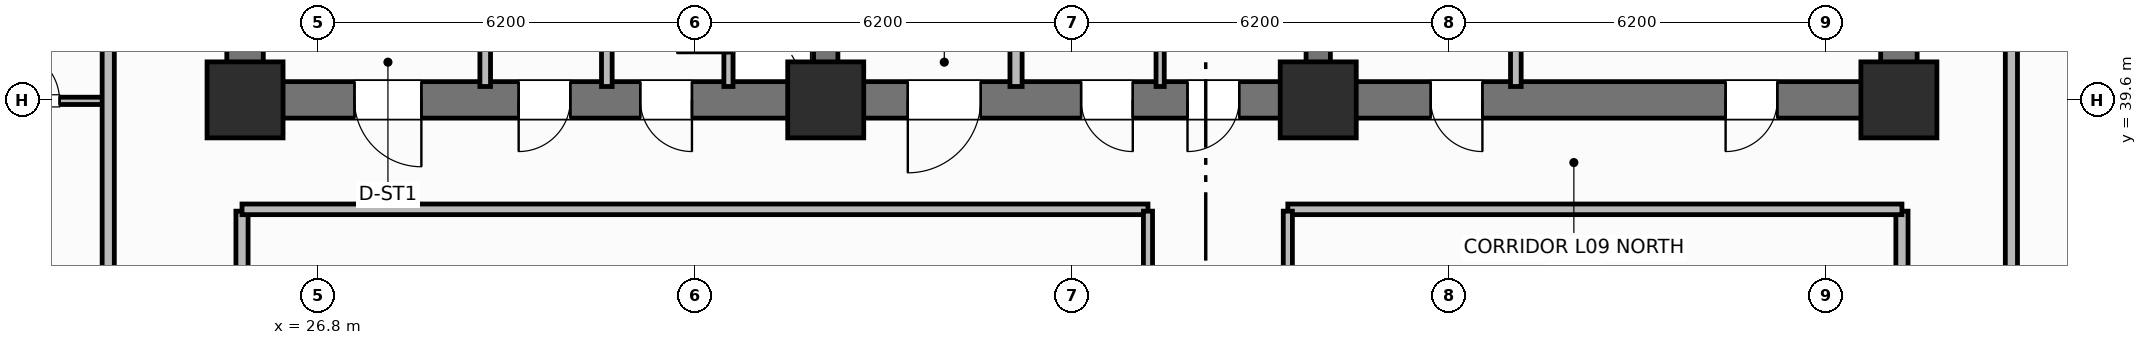
"""IFC4 building model, lengths in metres.
Left out: names, types, materials, properties, quantities, classifications, styles, units other than length and angle.
Written with IfcOpenShell. Run it as: python <this file> out.ifc"""

import sys

from ifc_helpers import new_model, si_unit, direction, frame, frame_2d, origin, origin_2d, place, context, subcontext, project, spatial, rectangle, extrude, element, fill, save


model = new_model("IFC4")
c1 = context("Model", 3, precision=1e-05, world=origin(), true_north=direction((0.0, 1.0)))
c2 = subcontext(c1, "Body", "Model", "MODEL_VIEW")
j1 = project(units=[si_unit("LENGTHUNIT", "METRE"), si_unit("PLANEANGLEUNIT", "RADIAN")], contexts=[c1])
p1 = place(None, origin())
s1 = spatial("IfcSite", under=j1, at=p1, CompositionType="ELEMENT")
p2 = place(p1, origin())
s2 = spatial("IfcBuilding", under=s1, at=p2, CompositionType="ELEMENT")
p3 = place(p2, frame((0.0, 0.0, 39.9)))
s3 = spatial("IfcBuildingStorey", under=s2, at=p3, CompositionType="ELEMENT", Elevation=39.9)
for number, where, z_axis, x_axis in (
    (1, (25.6, 39.9, 0.0), (0.0, 0.0, 1.0), (0.0, 1.0, 0.0)),
    (2, (52.8, 39.9, 0.0), (0.0, 0.0, 1.0), (0.0, 1.0, 0.0)),
):
    element("IfcWall", number, at=place(p3, frame(where, z_axis=z_axis, x_axis=x_axis)), inside=s3, PredefinedType="SHEAR", context=c2, shape_type="SweptSolid", body=[
        extrude(rectangle(XDim=5.6, YDim=0.6, at=frame_2d((2.8, 0.0))), origin(), (0.0, 0.0, 1.0), 3.7),
    ])
p4 = place(p3, frame((52.8, 39.6, 0.0), z_axis=(0.0, 0.0, 1.0), x_axis=(-1.0, 0.0, 0.0)))
e3 = element("IfcWall", 3, at=p4, inside=s3, PredefinedType="SHEAR", context=c2, shape_type="SweptSolid", body=[
    extrude(rectangle(XDim=27.2, YDim=0.6, at=frame_2d((13.6, 0.0))), origin(), (0.0, 0.0, 1.0), 3.7),
])
p5 = place(p4, frame((24.3, 0.0, 0.0)))
e4 = element("IfcOpeningElement", 4, at=p5, cuts=e3, PredefinedType="OPENING", context=c2, shape_type="SweptSolid", body=[
    extrude(rectangle(XDim=1.1, YDim=2.15, at=frame_2d((0.55, 1.075))), frame((0.0, 0.31, 0.0), z_axis=(0.0, -1.0, 0.0), x_axis=(1.0, 0.0, 0.0)), (0.0, 0.0, 1.0), 0.62),
])
p6 = place(p4, frame((21.85, 0.0, 0.0)))
e5 = element("IfcOpeningElement", 5, at=p6, cuts=e3, PredefinedType="OPENING", context=c2, shape_type="SweptSolid", body=[
    extrude(rectangle(XDim=0.85, YDim=2.1, at=frame_2d((0.425, 1.05))), frame((0.0, 0.31, 0.0), z_axis=(0.0, -1.0, 0.0), x_axis=(1.0, 0.0, 0.0)), (0.0, 0.0, 1.0), 0.62),
])
p7 = place(p4, frame((19.85, 0.0, 0.0)))
e6 = element("IfcOpeningElement", 6, at=p7, cuts=e3, PredefinedType="OPENING", context=c2, shape_type="SweptSolid", body=[
    extrude(rectangle(XDim=0.85, YDim=2.1, at=frame_2d((0.425, 1.05))), frame((0.0, 0.31, 0.0), z_axis=(0.0, -1.0, 0.0), x_axis=(1.0, 0.0, 0.0)), (0.0, 0.0, 1.0), 0.62),
])
p8 = place(p4, frame((15.1, 0.0, 0.0)))
e7 = element("IfcOpeningElement", 7, at=p8, cuts=e3, PredefinedType="OPENING", context=c2, shape_type="SweptSolid", body=[
    extrude(rectangle(XDim=1.2, YDim=2.15, at=frame_2d((0.6, 1.075))), frame((0.0, 0.31, 0.0), z_axis=(0.0, -1.0, 0.0), x_axis=(1.0, 0.0, 0.0)), (0.0, 0.0, 1.0), 0.62),
])
p9 = place(p4, frame((12.6, 0.0, 0.0)))
e8 = element("IfcOpeningElement", 8, at=p9, cuts=e3, PredefinedType="OPENING", context=c2, shape_type="SweptSolid", body=[
    extrude(rectangle(XDim=0.85, YDim=2.1, at=frame_2d((0.425, 1.05))), frame((0.0, 0.31, 0.0), z_axis=(0.0, -1.0, 0.0), x_axis=(1.0, 0.0, 0.0)), (0.0, 0.0, 1.0), 0.62),
])
p10 = place(p4, frame((10.85, 0.0, 0.0)))
e9 = element("IfcOpeningElement", 9, at=p10, cuts=e3, PredefinedType="OPENING", context=c2, shape_type="SweptSolid", body=[
    extrude(rectangle(XDim=0.85, YDim=2.1, at=frame_2d((0.425, 1.05))), frame((0.0, 0.31, 0.0), z_axis=(0.0, -1.0, 0.0), x_axis=(1.0, 0.0, 0.0)), (0.0, 0.0, 1.0), 0.62),
])
p11 = place(p4, frame((6.85, 0.0, 0.0)))
e10 = element("IfcOpeningElement", 10, at=p11, cuts=e3, PredefinedType="OPENING", context=c2, shape_type="SweptSolid", body=[
    extrude(rectangle(XDim=0.85, YDim=2.1, at=frame_2d((0.425, 1.05))), frame((0.0, 0.31, 0.0), z_axis=(0.0, -1.0, 0.0), x_axis=(1.0, 0.0, 0.0)), (0.0, 0.0, 1.0), 0.62),
])
p12 = place(p4, frame((2.0, 0.0, 0.0)))
e11 = element("IfcOpeningElement", 11, at=p12, cuts=e3, PredefinedType="OPENING", context=c2, shape_type="SweptSolid", body=[
    extrude(rectangle(XDim=0.85, YDim=2.1, at=frame_2d((0.425, 1.05))), frame((0.0, 0.31, 0.0), z_axis=(0.0, -1.0, 0.0), x_axis=(1.0, 0.0, 0.0)), (0.0, 0.0, 1.0), 0.62),
])
for number, where, z_axis, x_axis in (
    (12, (35.15, 39.9, 0.0), (0.0, 0.0, 1.0), (0.0, 1.0, 0.0)),
    (13, (43.25, 39.9, 0.0), (0.0, 0.0, 1.0), (0.0, 1.0, 0.0)),
):
    element("IfcWall", number, at=place(p3, frame(where, z_axis=z_axis, x_axis=x_axis)), inside=s3, PredefinedType="SHEAR", context=c2, shape_type="SweptSolid", body=[
        extrude(rectangle(XDim=5.6, YDim=0.4, at=frame_2d((2.8, 0.0))), origin(), (0.0, 0.0, 1.0), 3.7),
    ])
for number, where, z_axis, x_axis in (
    (14, (25.6, 39.6, 0.0), (0.0, 0.0, 1.0), (1.0, 0.0, 0.0)),
    (15, (35.15, 39.6, 0.0), (0.0, 0.0, 1.0), (1.0, 0.0, 0.0)),
    (16, (43.25, 39.6, 0.0), (0.0, 0.0, 1.0), (1.0, 0.0, 0.0)),
    (17, (52.8, 39.6, 0.0), (0.0, 0.0, 1.0), (1.0, 0.0, 0.0)),
):
    element("IfcColumn", number, at=place(p3, frame(where, z_axis=z_axis, x_axis=x_axis)), inside=s3, PredefinedType="COLUMN", context=c2, shape_type="SweptSolid", body=[
        extrude(rectangle(XDim=1.25, YDim=1.25, at=origin_2d()), origin(), (0.0, 0.0, 1.0), 3.7),
    ])
p13 = place(p3, frame((33.55, 39.82, 0.0), z_axis=(0.0, 0.0, 1.0), x_axis=(0.0, 1.0, 0.0)))
e18 = element("IfcWall", 18, at=p13, inside=s3, PredefinedType="PARTITIONING", context=c2, shape_type="SweptSolid", body=[
    extrude(rectangle(XDim=2.13, YDim=0.15, at=frame_2d((1.065, 0.0))), origin(), (0.0, 0.0, 1.0), 2.53),
])
p14 = place(p13, frame((0.55, 0.0, 0.0)))
e19 = element("IfcOpeningElement", 19, at=p14, cuts=e18, PredefinedType="OPENING", context=c2, shape_type="SweptSolid", body=[
    extrude(rectangle(XDim=0.85, YDim=2.05, at=frame_2d((0.425, 1.025))), frame((0.0, 0.085, 0.0), z_axis=(0.0, -1.0, 0.0), x_axis=(1.0, 0.0, 0.0)), (0.0, 0.0, 1.0), 0.17),
])
for number, where, z_axis, x_axis in (
    (20, (29.55, 39.82, 0.0), (0.0, 0.0, 1.0), (0.0, 1.0, 0.0)),
    (21, (31.55, 39.82, 0.0), (0.0, 0.0, 1.0), (0.0, 1.0, 0.0)),
):
    element("IfcWall", number, at=place(p3, frame(where, z_axis=z_axis, x_axis=x_axis)), inside=s3, PredefinedType="PARTITIONING", context=c2, shape_type="SweptSolid", body=[
        extrude(rectangle(XDim=2.13, YDim=0.175, at=frame_2d((1.065, 0.0))), origin(), (0.0, 0.0, 1.0), 2.53),
    ])
p15 = place(p3, frame((38.28, 39.82, 0.0), z_axis=(0.0, 0.0, 1.0), x_axis=(0.0, 1.0, 0.0)))
e22 = element("IfcWall", 22, at=p15, inside=s3, PredefinedType="PARTITIONING", context=c2, shape_type="SweptSolid", body=[
    extrude(rectangle(XDim=2.73, YDim=0.2, at=frame_2d((1.365, 0.0))), origin(), (0.0, 0.0, 1.0), 2.53),
])
p16 = place(p3, frame((40.65, 39.82, 0.0), z_axis=(0.0, 0.0, 1.0), x_axis=(0.0, 1.0, 0.0)))
e23 = element("IfcWall", 23, at=p16, inside=s3, PredefinedType="PARTITIONING", context=c2, shape_type="SweptSolid", body=[
    extrude(rectangle(XDim=2.73, YDim=0.135, at=frame_2d((1.365, 0.0))), origin(), (0.0, 0.0, 1.0), 2.53),
])
p17 = place(p3, frame((46.5, 39.82, 0.0), z_axis=(0.0, 0.0, 1.0), x_axis=(0.0, 1.0, 0.0)))
e24 = element("IfcWall", 24, at=p17, inside=s3, PredefinedType="PARTITIONING", context=c2, shape_type="SweptSolid", body=[
    extrude(rectangle(XDim=2.73, YDim=0.175, at=frame_2d((1.365, 0.0))), origin(), (0.0, 0.0, 1.0), 2.53),
])
for number, where, z_axis, x_axis in (
    (25, (25.55, 18.63, 0.0), (0.0, 0.0, 1.0), (0.0, 1.0, 0.0)),
    (26, (52.85, 18.63, 0.0), (0.0, 0.0, 1.0), (0.0, 1.0, 0.0)),
):
    element("IfcWall", number, at=place(p3, frame(where, z_axis=z_axis, x_axis=x_axis)), inside=s3, PredefinedType="PARTITIONING", context=c2, shape_type="SweptSolid", body=[
        extrude(rectangle(XDim=19.14, YDim=0.2, at=frame_2d((9.57, 0.0))), origin(), (0.0, 0.0, 1.0), 2.53),
    ])
p18 = place(p3, frame((25.55, 37.8, 0.0), z_axis=(0.0, 0.0, 1.0), x_axis=(1.0, 0.0, 0.0)))
e27 = element("IfcWall", 27, at=p18, inside=s3, PredefinedType="PARTITIONING", context=c2, shape_type="SweptSolid", body=[
    extrude(rectangle(XDim=14.9, YDim=0.175, at=frame_2d((7.45, 0.0))), origin(), (0.0, 0.0, 1.0), 2.53),
])
p19 = place(p3, frame((42.75, 37.8, 0.0), z_axis=(0.0, 0.0, 1.0), x_axis=(1.0, 0.0, 0.0)))
e28 = element("IfcWall", 28, at=p19, inside=s3, PredefinedType="PARTITIONING", context=c2, shape_type="SweptSolid", body=[
    extrude(rectangle(XDim=10.1, YDim=0.175, at=frame_2d((5.05, 0.0))), origin(), (0.0, 0.0, 1.0), 2.53),
])
p20 = place(p3, frame((40.45, 18.63, 0.0), z_axis=(0.0, 0.0, 1.0), x_axis=(0.0, 1.0, 0.0)))
e29 = element("IfcWall", 29, at=p20, inside=s3, PredefinedType="PARTITIONING", context=c2, shape_type="SweptSolid", body=[
    extrude(rectangle(XDim=19.14, YDim=0.15, at=frame_2d((9.57, 0.0))), origin(), (0.0, 0.0, 1.0), 2.53),
])
p21 = place(p20, frame((2.4, 0.0, 0.0)))
e30 = element("IfcOpeningElement", 30, at=p21, cuts=e29, PredefinedType="OPENING", context=c2, shape_type="SweptSolid", body=[
    extrude(rectangle(XDim=1.0, YDim=2.15, at=frame_2d((0.5, 1.075))), frame((0.0, 0.085, 0.0), z_axis=(0.0, -1.0, 0.0), x_axis=(1.0, 0.0, 0.0)), (0.0, 0.0, 1.0), 0.17),
])
p22 = place(p20, frame((11.4, 0.0, 0.0)))
e31 = element("IfcOpeningElement", 31, at=p22, cuts=e29, PredefinedType="OPENING", context=c2, shape_type="SweptSolid", body=[
    extrude(rectangle(XDim=1.0, YDim=2.15, at=frame_2d((0.5, 1.075))), frame((0.0, 0.085, 0.0), z_axis=(0.0, -1.0, 0.0), x_axis=(1.0, 0.0, 0.0)), (0.0, 0.0, 1.0), 0.17),
])
p23 = place(p3, frame((42.75, 18.63, 0.0), z_axis=(0.0, 0.0, 1.0), x_axis=(0.0, 1.0, 0.0)))
e32 = element("IfcWall", 32, at=p23, inside=s3, PredefinedType="PARTITIONING", context=c2, shape_type="SweptSolid", body=[
    extrude(rectangle(XDim=19.14, YDim=0.15, at=frame_2d((9.57, 0.0))), origin(), (0.0, 0.0, 1.0), 2.53),
])
p24 = place(p23, frame((5.5, 0.0, 0.0)))
e33 = element("IfcOpeningElement", 33, at=p24, cuts=e32, PredefinedType="OPENING", context=c2, shape_type="SweptSolid", body=[
    extrude(rectangle(XDim=1.0, YDim=2.15, at=frame_2d((0.5, 1.075))), frame((0.0, 0.085, 0.0), z_axis=(0.0, -1.0, 0.0), x_axis=(1.0, 0.0, 0.0)), (0.0, 0.0, 1.0), 0.17),
])
p25 = place(p3, frame((21.1, 39.584, 0.0), z_axis=(0.0, 0.0, 1.0), x_axis=(1.0, 0.0, 0.0)))
e34 = element("IfcWall", 34, at=p25, inside=s3, PredefinedType="PARTITIONING", context=c2, shape_type="SweptSolid", body=[
    extrude(rectangle(XDim=2.25, YDim=0.12, at=frame_2d((1.125, 0.0))), origin(), (0.0, 0.0, 1.0), 2.53),
])
p26 = place(p25, frame((0.6, 0.0, 0.0)))
e35 = element("IfcOpeningElement", 35, at=p26, cuts=e34, PredefinedType="OPENING", context=c2, shape_type="SweptSolid", body=[
    extrude(rectangle(XDim=0.85, YDim=2.1, at=frame_2d((0.425, 1.05))), frame((0.0, 0.07, 0.0), z_axis=(0.0, -1.0, 0.0), x_axis=(1.0, 0.0, 0.0)), (0.0, 0.0, 1.0), 0.14),
])
p27 = place(p3, frame((23.35, 10.6, 0.0), z_axis=(0.0, 0.0, 1.0), x_axis=(0.0, 1.0, 0.0)))
e36 = element("IfcWall", 36, at=p27, inside=s3, PredefinedType="PARTITIONING", context=c2, shape_type="SweptSolid", body=[
    extrude(rectangle(XDim=35.2, YDim=0.2, at=frame_2d((17.6, 0.0))), origin(), (0.0, 0.0, 1.0), 2.53),
])
p28 = place(p27, frame((2.65, 0.0, 0.0)))
e37 = element("IfcOpeningElement", 37, at=p28, cuts=e36, PredefinedType="OPENING", context=c2, shape_type="SweptSolid", body=[
    extrude(rectangle(XDim=1.0, YDim=2.15, at=frame_2d((0.5, 1.075))), frame((0.0, 0.11, 0.0), z_axis=(0.0, -1.0, 0.0), x_axis=(1.0, 0.0, 0.0)), (0.0, 0.0, 1.0), 0.22),
])
p29 = place(p27, frame((12.65, 0.0, 0.0)))
e38 = element("IfcOpeningElement", 38, at=p29, cuts=e36, PredefinedType="OPENING", context=c2, shape_type="SweptSolid", body=[
    extrude(rectangle(XDim=1.0, YDim=2.15, at=frame_2d((0.5, 1.075))), frame((0.0, 0.11, 0.0), z_axis=(0.0, -1.0, 0.0), x_axis=(1.0, 0.0, 0.0)), (0.0, 0.0, 1.0), 0.22),
])
p30 = place(p27, frame((24.134, 0.0, 0.0)))
e39 = element("IfcOpeningElement", 39, at=p30, cuts=e36, PredefinedType="OPENING", context=c2, shape_type="SweptSolid", body=[
    extrude(rectangle(XDim=1.0, YDim=2.15, at=frame_2d((0.5, 1.075))), frame((0.0, 0.11, 0.0), z_axis=(0.0, -1.0, 0.0), x_axis=(1.0, 0.0, 0.0)), (0.0, 0.0, 1.0), 0.22),
])
p31 = place(p3, frame((54.65, 10.6, 0.0), z_axis=(0.0, 0.0, 1.0), x_axis=(0.0, 1.0, 0.0)))
e40 = element("IfcWall", 40, at=p31, inside=s3, PredefinedType="PARTITIONING", context=c2, shape_type="SweptSolid", body=[
    extrude(rectangle(XDim=35.2, YDim=0.2, at=frame_2d((17.6, 0.0))), origin(), (0.0, 0.0, 1.0), 2.53),
])
p32 = place(p31, frame((2.65, 0.0, 0.0)))
e41 = element("IfcOpeningElement", 41, at=p32, cuts=e40, PredefinedType="OPENING", context=c2, shape_type="SweptSolid", body=[
    extrude(rectangle(XDim=1.0, YDim=2.15, at=frame_2d((0.5, 1.075))), frame((0.0, 0.11, 0.0), z_axis=(0.0, -1.0, 0.0), x_axis=(1.0, 0.0, 0.0)), (0.0, 0.0, 1.0), 0.22),
])
p33 = place(p31, frame((19.95, 0.0, 0.0)))
e42 = element("IfcOpeningElement", 42, at=p33, cuts=e40, PredefinedType="OPENING", context=c2, shape_type="SweptSolid", body=[
    extrude(rectangle(XDim=1.0, YDim=2.15, at=frame_2d((0.5, 1.075))), frame((0.0, 0.11, 0.0), z_axis=(0.0, -1.0, 0.0), x_axis=(1.0, 0.0, 0.0)), (0.0, 0.0, 1.0), 0.22),
])
p34 = place(p14, origin())
e43 = element("IfcDoor", 43, at=p34, inside=s3, OperationType="SINGLE_SWING_LEFT", PredefinedType="TRAPDOOR", context=c2, shape_type="SweptSolid", body=[
    extrude(rectangle(XDim=0.85, YDim=2.05, at=frame_2d((0.425, 1.025))), frame((0.0, 0.025, 0.0), z_axis=(0.0, -1.0, 0.0), x_axis=(1.0, 0.0, 0.0)), (0.0, 0.0, 1.0), 0.05),
])
fill(e19, e43)
p35 = place(p26, origin())
e44 = element("IfcDoor", 44, at=p35, inside=s3, OperationType="SINGLE_SWING_LEFT", PredefinedType="DOOR", context=c2, shape_type="SweptSolid", body=[
    extrude(rectangle(XDim=0.85, YDim=2.1, at=frame_2d((0.425, 1.05))), frame((0.0, 0.025, 0.0), z_axis=(0.0, -1.0, 0.0), x_axis=(1.0, 0.0, 0.0)), (0.0, 0.0, 1.0), 0.05),
])
fill(e35, e44)
p36 = place(p5, origin())
e45 = element("IfcDoor", 45, at=p36, inside=s3, OperationType="SINGLE_SWING_LEFT", PredefinedType="DOOR", context=c2, shape_type="SweptSolid", body=[
    extrude(rectangle(XDim=1.1, YDim=2.15, at=frame_2d((0.55, 1.075))), frame((0.0, 0.025, 0.0), z_axis=(0.0, -1.0, 0.0), x_axis=(1.0, 0.0, 0.0)), (0.0, 0.0, 1.0), 0.05),
])
fill(e4, e45)
p37 = place(p6, origin())
e46 = element("IfcDoor", 46, at=p37, inside=s3, OperationType="SINGLE_SWING_RIGHT", PredefinedType="DOOR", context=c2, shape_type="SweptSolid", body=[
    extrude(rectangle(XDim=0.85, YDim=2.1, at=frame_2d((0.425, 1.05))), frame((0.0, 0.025, 0.0), z_axis=(0.0, -1.0, 0.0), x_axis=(1.0, 0.0, 0.0)), (0.0, 0.0, 1.0), 0.05),
])
fill(e5, e46)
p38 = place(p7, origin())
e47 = element("IfcDoor", 47, at=p38, inside=s3, OperationType="SINGLE_SWING_LEFT", PredefinedType="DOOR", context=c2, shape_type="SweptSolid", body=[
    extrude(rectangle(XDim=0.85, YDim=2.1, at=frame_2d((0.425, 1.05))), frame((0.0, 0.025, 0.0), z_axis=(0.0, -1.0, 0.0), x_axis=(1.0, 0.0, 0.0)), (0.0, 0.0, 1.0), 0.05),
])
fill(e6, e47)
p39 = place(p8, origin())
e48 = element("IfcDoor", 48, at=p39, inside=s3, OperationType="SINGLE_SWING_RIGHT", PredefinedType="DOOR", context=c2, shape_type="SweptSolid", body=[
    extrude(rectangle(XDim=1.2, YDim=2.15, at=frame_2d((0.6, 1.075))), frame((0.0, 0.025, 0.0), z_axis=(0.0, -1.0, 0.0), x_axis=(1.0, 0.0, 0.0)), (0.0, 0.0, 1.0), 0.05),
])
fill(e7, e48)
p40 = place(p9, origin())
e49 = element("IfcDoor", 49, at=p40, inside=s3, OperationType="SINGLE_SWING_LEFT", PredefinedType="DOOR", context=c2, shape_type="SweptSolid", body=[
    extrude(rectangle(XDim=0.85, YDim=2.1, at=frame_2d((0.425, 1.05))), frame((0.0, 0.025, 0.0), z_axis=(0.0, -1.0, 0.0), x_axis=(1.0, 0.0, 0.0)), (0.0, 0.0, 1.0), 0.05),
])
fill(e8, e49)
p41 = place(p10, origin())
e50 = element("IfcDoor", 50, at=p41, inside=s3, OperationType="SINGLE_SWING_RIGHT", PredefinedType="DOOR", context=c2, shape_type="SweptSolid", body=[
    extrude(rectangle(XDim=0.85, YDim=2.1, at=frame_2d((0.425, 1.05))), frame((0.0, 0.025, 0.0), z_axis=(0.0, -1.0, 0.0), x_axis=(1.0, 0.0, 0.0)), (0.0, 0.0, 1.0), 0.05),
])
fill(e9, e50)
p42 = place(p11, origin())
e51 = element("IfcDoor", 51, at=p42, inside=s3, OperationType="SINGLE_SWING_LEFT", PredefinedType="DOOR", context=c2, shape_type="SweptSolid", body=[
    extrude(rectangle(XDim=0.85, YDim=2.1, at=frame_2d((0.425, 1.05))), frame((0.0, 0.025, 0.0), z_axis=(0.0, -1.0, 0.0), x_axis=(1.0, 0.0, 0.0)), (0.0, 0.0, 1.0), 0.05),
])
fill(e10, e51)
p43 = place(p12, origin())
e52 = element("IfcDoor", 52, at=p43, inside=s3, OperationType="SINGLE_SWING_RIGHT", PredefinedType="DOOR", context=c2, shape_type="SweptSolid", body=[
    extrude(rectangle(XDim=0.85, YDim=2.1, at=frame_2d((0.425, 1.05))), frame((0.0, 0.025, 0.0), z_axis=(0.0, -1.0, 0.0), x_axis=(1.0, 0.0, 0.0)), (0.0, 0.0, 1.0), 0.05),
])
fill(e11, e52)
save(model, sys.argv[1])
